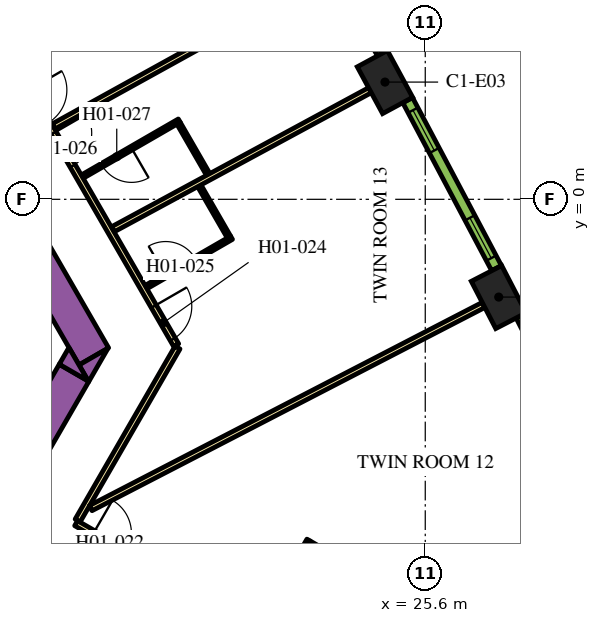
"""IFC4 building model, lengths in metres.
Left out: names, types, materials, properties, quantities, classifications, styles, units other than length and angle.
Written with IfcOpenShell. Run it as: python <this file> out.ifc"""

import sys

from ifc_helpers import new_model, si_unit, direction, frame, frame_2d, origin, origin_2d, place, context, subcontext, project, spatial, polyline, rectangle, outline, extrude, element, fill, save


model = new_model("IFC4")
c1 = context("Model", 3, precision=1e-05, world=origin(), true_north=direction((0.0, 1.0)))
c2 = subcontext(c1, "Body", "Model", "MODEL_VIEW")
j1 = project(units=[si_unit("LENGTHUNIT", "METRE"), si_unit("PLANEANGLEUNIT", "RADIAN")], contexts=[c1])
p1 = place(None, origin())
s1 = spatial("IfcSite", under=j1, at=p1, CompositionType="ELEMENT")
p2 = place(p1, origin())
s2 = spatial("IfcBuilding", under=s1, at=p2, CompositionType="ELEMENT")
p3 = place(p2, frame((0.0, 0.0, 31.5)))
s3 = spatial("IfcBuildingStorey", under=s2, at=p3, CompositionType="ELEMENT", Elevation=31.5)
for number, where, z_axis, x_axis in (
    (1, (27.533, -2.572, 0.0), (0.0, 0.0, 1.0), (-0.459, 0.888, 0.0)),
    (2, (24.54, 3.085, 0.0), (0.0, 0.0, 1.0), (-0.476, 0.88, 0.0)),
):
    element("IfcColumn", number, at=place(p3, frame(where, z_axis=z_axis, x_axis=x_axis)), inside=s3, PredefinedType="COLUMN", context=c2, shape_type="SweptSolid", body=[
        extrude(rectangle(XDim=1.4, YDim=0.9, at=origin_2d()), origin(), (0.0, 0.0, 1.0), 3.9),
    ])
p4 = place(p3, frame((6.711, 13.476, 0.0), z_axis=(0.0, 0.0, 1.0), x_axis=(0.500002723396, -0.866023831425, 0.0)))
e3 = element("IfcWall", 3, at=p4, inside=s3, PredefinedType="SOLIDWALL", context=c2, shape_type="SweptSolid", body=[
    extrude(rectangle(XDim=20.334, YDim=0.9, at=frame_2d((10.167, 0.0))), origin(), (0.0, 0.0, 1.0), 3.9),
])
p5 = place(p3, origin())
e4 = element("IfcWall", 4, at=p5, inside=s3, PredefinedType="SOLIDWALL", context=c2, shape_type="SweptSolid", body=[
    extrude(outline(polyline([(16.743, -4.8), (16.489, -4.36), (17.251, -3.92), (16.743, -4.8)])), origin(), (0.0, 0.0, 1.0), 3.9),
])
p6 = place(p3, frame((11.695, -12.644, 0.0), z_axis=(0.0, 0.0, 1.0), x_axis=(0.500010229568, 0.86601949766, 0.0)))
e5 = element("IfcWall", 5, at=p6, inside=s3, PredefinedType="SOLIDWALL", context=c2, shape_type="SweptSolid", body=[
    extrude(rectangle(XDim=9.326, YDim=0.9, at=frame_2d((4.663, 0.0))), origin(), (0.0, 0.0, 1.0), 3.9),
])
e6 = element("IfcWall", 6, at=p5, inside=s3, PredefinedType="SOLIDWALL", context=c2, shape_type="SweptSolid", body=[
    extrude(outline(polyline([(16.223, -3.9), (16.732, -4.78), (15.969, -4.34), (16.223, -3.9)])), origin(), (0.0, 0.0, 1.0), 3.9),
])
p7 = place(p3, frame((16.412, -8.523, 0.0), z_axis=(0.0, 0.0, 1.0), x_axis=(0.866022197818, -0.500005552856, 0.0)))
e7 = element("IfcWall", 7, at=p7, inside=s3, PredefinedType="PARTITIONING", context=c2, shape_type="SweptSolid", body=[
    extrude(rectangle(XDim=16.224, YDim=0.15, at=frame_2d((8.112, 0.0))), origin(), (0.0, 0.0, 1.0), 2.75),
])
p8 = place(p7, frame((7.949, 0.0, 0.0)))
e8 = element("IfcOpeningElement", 8, at=p8, cuts=e7, PredefinedType="OPENING", context=c2, shape_type="SweptSolid", body=[
    extrude(rectangle(XDim=1.0, YDim=2.1, at=frame_2d((0.5, 1.05))), frame((0.0, 0.085, 0.0), z_axis=(0.0, -1.0, 0.0), x_axis=(1.0, 0.0, 0.0)), (0.0, 0.0, 1.0), 0.17),
])
p9 = place(p7, frame((0.526, 0.0, 0.0)))
e9 = element("IfcOpeningElement", 9, at=p9, cuts=e7, PredefinedType="OPENING", context=c2, shape_type="SweptSolid", body=[
    extrude(rectangle(XDim=1.0, YDim=2.1, at=frame_2d((0.5, 1.05))), frame((0.0, 0.085, 0.0), z_axis=(0.0, -1.0, 0.0), x_axis=(1.0, 0.0, 0.0)), (0.0, 0.0, 1.0), 0.17),
])
p10 = place(p3, frame((19.081, -3.9, 0.0), z_axis=(0.0, 0.0, 1.0), x_axis=(-0.499974327079, -0.866040225545, 0.0)))
e10 = element("IfcWall", 10, at=p10, inside=s3, PredefinedType="PARTITIONING", context=c2, shape_type="SweptSolid", body=[
    extrude(rectangle(XDim=5.258, YDim=0.15, at=frame_2d((2.629, 0.0))), origin(), (0.0, 0.0, 1.0), 2.75),
])
p11 = place(p3, frame((6.163, 18.475, 0.0), z_axis=(0.0, 0.0, 1.0), x_axis=(0.500001317485, -0.866024643133, 0.0)))
e11 = element("IfcWall", 11, at=p11, inside=s3, PredefinedType="PARTITIONING", context=c2, shape_type="SweptSolid", body=[
    extrude(rectangle(XDim=25.767, YDim=0.15, at=frame_2d((12.883, 0.0))), origin(), (0.0, 0.0, 1.0), 2.75),
])
p12 = place(p11, frame((24.586, 0.0, 0.0)))
e12 = element("IfcOpeningElement", 12, at=p12, cuts=e11, PredefinedType="OPENING", context=c2, shape_type="SweptSolid", body=[
    extrude(rectangle(XDim=1.0, YDim=2.1, at=frame_2d((0.5, 1.05))), frame((0.0, 0.085, 0.0), z_axis=(0.0, -1.0, 0.0), x_axis=(1.0, 0.0, 0.0)), (0.0, 0.0, 1.0), 0.17),
])
p13 = place(p11, frame((19.319, 0.0, 0.0)))
e13 = element("IfcOpeningElement", 13, at=p13, cuts=e11, PredefinedType="OPENING", context=c2, shape_type="SweptSolid", body=[
    extrude(rectangle(XDim=1.0, YDim=2.1, at=frame_2d((0.5, 1.05))), frame((0.0, 0.085, 0.0), z_axis=(0.0, -1.0, 0.0), x_axis=(1.0, 0.0, 0.0)), (0.0, 0.0, 1.0), 0.17),
])
p14 = place(p11, frame((18.012, 0.0, 0.0)))
e14 = element("IfcOpeningElement", 14, at=p14, cuts=e11, PredefinedType="OPENING", context=c2, shape_type="SweptSolid", body=[
    extrude(rectangle(XDim=1.0, YDim=2.1, at=frame_2d((0.5, 1.05))), frame((0.0, 0.085, 0.0), z_axis=(0.0, -1.0, 0.0), x_axis=(1.0, 0.0, 0.0)), (0.0, 0.0, 1.0), 0.17),
])
p15 = place(p11, frame((6.824, 0.0, 0.0)))
e15 = element("IfcOpeningElement", 15, at=p15, cuts=e11, PredefinedType="OPENING", context=c2, shape_type="SweptSolid", body=[
    extrude(rectangle(XDim=1.1, YDim=2.1, at=frame_2d((0.55, 1.05))), frame((0.0, 0.085, 0.0), z_axis=(0.0, -1.0, 0.0), x_axis=(1.0, 0.0, 0.0)), (0.0, 0.0, 1.0), 0.17),
])
p16 = place(p11, frame((4.658, 0.0, 0.0)))
e16 = element("IfcOpeningElement", 16, at=p16, cuts=e11, PredefinedType="OPENING", context=c2, shape_type="SweptSolid", body=[
    extrude(rectangle(XDim=0.9, YDim=2.1, at=frame_2d((0.45, 1.05))), frame((0.0, 0.085, 0.0), z_axis=(0.0, -1.0, 0.0), x_axis=(1.0, 0.0, 0.0)), (0.0, 0.0, 1.0), 0.17),
])
p17 = place(p11, frame((0.18, 0.0, 0.0)))
e17 = element("IfcOpeningElement", 17, at=p17, cuts=e11, PredefinedType="OPENING", context=c2, shape_type="SweptSolid", body=[
    extrude(rectangle(XDim=1.0, YDim=2.1, at=frame_2d((0.5, 1.05))), frame((0.0, 0.085, 0.0), z_axis=(0.0, -1.0, 0.0), x_axis=(1.0, 0.0, 0.0)), (0.0, 0.0, 1.0), 0.17),
])
p18 = place(p3, frame((23.132, 5.962, 0.0), z_axis=(0.0, 0.0, 1.0), x_axis=(-0.875121716713, -0.483902863121, 0.0)))
e18 = element("IfcWall", 18, at=p18, inside=s3, PredefinedType="PARTITIONING", context=c2, shape_type="SweptSolid", body=[
    extrude(rectangle(XDim=8.355, YDim=0.15, at=frame_2d((4.178, 0.0))), origin(), (0.0, 0.0, 1.0), 2.75),
])
p19 = place(p3, frame((27.134, -2.779, 0.0), z_axis=(0.0, 0.0, 1.0), x_axis=(-0.8882049501, -0.459447457951, 0.0)))
e19 = element("IfcWall", 19, at=p19, inside=s3, PredefinedType="PARTITIONING", context=c2, shape_type="SweptSolid", body=[
    extrude(rectangle(XDim=11.638, YDim=0.15, at=frame_2d((5.819, 0.0))), origin(), (0.0, 0.0, 1.0), 2.75),
])
p20 = place(p3, frame((24.145, 2.871, 0.0), z_axis=(0.0, 0.0, 1.0), x_axis=(-0.879551725039, -0.475803281809, 0.0)))
e20 = element("IfcWall", 20, at=p20, inside=s3, PredefinedType="PARTITIONING", context=c2, shape_type="SweptSolid", body=[
    extrude(rectangle(XDim=7.688, YDim=0.15, at=frame_2d((3.844, 0.0))), origin(), (0.0, 0.0, 1.0), 2.75),
])
p21 = place(p3, frame((30.018, -8.483, 0.0), z_axis=(0.0, 0.0, 1.0), x_axis=(-0.896544505264, -0.44295366584, 0.0)))
e21 = element("IfcWall", 21, at=p21, inside=s3, PredefinedType="PARTITIONING", context=c2, shape_type="SweptSolid", body=[
    extrude(rectangle(XDim=8.079, YDim=0.15, at=frame_2d((4.04, 0.0))), origin(), (0.0, 0.0, 1.0), 2.75),
])
p22 = place(p3, frame((22.53, -8.966, 0.0), z_axis=(0.0, 0.0, 1.0), x_axis=(-0.500006934395, -0.866021400173, 0.0)))
e22 = element("IfcWall", 22, at=p22, inside=s3, PredefinedType="PARTITIONING", context=c2, shape_type="SweptSolid", body=[
    extrude(rectangle(XDim=2.6, YDim=0.1, at=frame_2d((1.3, 0.0))), origin(), (0.0, 0.0, 1.0), 2.75),
])
p23 = place(p22, frame((1.1, 0.0, 0.0)))
e23 = element("IfcOpeningElement", 23, at=p23, cuts=e22, PredefinedType="OPENING", context=c2, shape_type="SweptSolid", body=[
    extrude(rectangle(XDim=0.9, YDim=2.1, at=frame_2d((0.45, 1.05))), frame((0.0, 0.06, 0.0), z_axis=(0.0, -1.0, 0.0), x_axis=(1.0, 0.0, 0.0)), (0.0, 0.0, 1.0), 0.12),
])
p24 = place(p3, frame((22.549, -9.035, 0.0), z_axis=(0.0, 0.0, 1.0), x_axis=(0.86605165483, -0.499954529098, 0.0)))
e24 = element("IfcWall", 24, at=p24, inside=s3, PredefinedType="PARTITIONING", context=c2, shape_type="SweptSolid", body=[
    extrude(rectangle(XDim=1.7, YDim=0.1, at=frame_2d((0.85, 0.0))), origin(), (0.0, 0.0, 1.0), 2.75),
])
p25 = place(p3, frame((18.25, -2.311, 0.0), z_axis=(0.0, 0.0, 1.0), x_axis=(0.866021400173, 0.500006934395, 0.0)))
e25 = element("IfcWall", 25, at=p25, inside=s3, PredefinedType="PARTITIONING", context=c2, shape_type="SweptSolid", body=[
    extrude(rectangle(XDim=2.6, YDim=0.1, at=frame_2d((1.3, 0.0))), origin(), (0.0, 0.0, 1.0), 2.75),
])
p26 = place(p25, frame((0.6, 0.0, 0.0)))
e26 = element("IfcOpeningElement", 26, at=p26, cuts=e25, PredefinedType="OPENING", context=c2, shape_type="SweptSolid", body=[
    extrude(rectangle(XDim=0.9, YDim=2.1, at=frame_2d((0.45, 1.05))), frame((0.0, 0.06, 0.0), z_axis=(0.0, -1.0, 0.0), x_axis=(1.0, 0.0, 0.0)), (0.0, 0.0, 1.0), 0.12),
])
p27 = place(p3, frame((20.434, -0.993, 0.0), z_axis=(0.0, 0.0, 1.0), x_axis=(-0.500086022567, 0.865975732936, 0.0)))
e27 = element("IfcWall", 27, at=p27, inside=s3, PredefinedType="PARTITIONING", context=c2, shape_type="SweptSolid", body=[
    extrude(rectangle(XDim=1.55, YDim=0.1, at=frame_2d((0.775, 0.0))), origin(), (0.0, 0.0, 1.0), 2.75),
])
p28 = place(p3, frame((19.127, 2.071, 0.0), z_axis=(0.0, 0.0, 1.0), x_axis=(-0.866003658127, -0.500037662692, 0.0)))
e28 = element("IfcWall", 28, at=p28, inside=s3, PredefinedType="PARTITIONING", context=c2, shape_type="SweptSolid", body=[
    extrude(rectangle(XDim=2.95, YDim=0.1, at=frame_2d((1.475, 0.0))), origin(), (0.0, 0.0, 1.0), 2.75),
])
p29 = place(p28, frame((1.45, 0.0, 0.0)))
e29 = element("IfcOpeningElement", 29, at=p29, cuts=e28, PredefinedType="OPENING", context=c2, shape_type="SweptSolid", body=[
    extrude(rectangle(XDim=0.9, YDim=2.1, at=frame_2d((0.45, 1.05))), frame((0.0, 0.06, 0.0), z_axis=(0.0, -1.0, 0.0), x_axis=(1.0, 0.0, 0.0)), (0.0, 0.0, 1.0), 0.12),
])
p30 = place(p3, frame((19.109, 2.002, 0.0), z_axis=(0.0, 0.0, 1.0), x_axis=(0.500086022567, -0.865975732936, 0.0)))
e30 = element("IfcWall", 30, at=p30, inside=s3, PredefinedType="PARTITIONING", context=c2, shape_type="SweptSolid", body=[
    extrude(rectangle(XDim=1.55, YDim=0.1, at=frame_2d((0.775, 0.0))), origin(), (0.0, 0.0, 1.0), 2.75),
])
p31 = place(p3, frame((30.377, -7.521, 0.0), z_axis=(0.0, 0.0, 1.0), x_axis=(-0.451233929645, 0.892405704115, 0.0)))
e31 = element("IfcWall", 31, at=p31, inside=s3, PredefinedType="SOLIDWALL", context=c2, shape_type="SweptSolid", body=[
    extrude(rectangle(XDim=4.998, YDim=0.29, at=frame_2d((2.499, 0.0))), origin(), (0.0, 0.0, 1.0), 3.65),
])
p32 = place(p31, frame((0.297, 0.0, 0.9)))
e32 = element("IfcOpeningElement", 32, at=p32, cuts=e31, PredefinedType="OPENING", context=c2, shape_type="SweptSolid", body=[
    extrude(rectangle(XDim=1.2, YDim=2.15, at=frame_2d((0.6, 1.075))), frame((0.0, 0.155, 0.0), z_axis=(0.0, -1.0, 0.0), x_axis=(1.0, 0.0, 0.0)), (0.0, 0.0, 1.0), 0.31),
])
p33 = place(p31, frame((3.501, 0.0, 0.9)))
e33 = element("IfcOpeningElement", 33, at=p33, cuts=e31, PredefinedType="OPENING", context=c2, shape_type="SweptSolid", body=[
    extrude(rectangle(XDim=1.2, YDim=2.15, at=frame_2d((0.6, 1.075))), frame((0.0, 0.155, 0.0), z_axis=(0.0, -1.0, 0.0), x_axis=(1.0, 0.0, 0.0)), (0.0, 0.0, 1.0), 0.31),
])
p34 = place(p3, frame((27.475, -1.81, 0.0), z_axis=(0.0, 0.0, 1.0), x_axis=(-0.467629620899, 0.883924509026, 0.0)))
e34 = element("IfcWall", 34, at=p34, inside=s3, PredefinedType="SOLIDWALL", context=c2, shape_type="SweptSolid", body=[
    extrude(rectangle(XDim=4.998, YDim=0.29, at=frame_2d((2.499, 0.0))), origin(), (0.0, 0.0, 1.0), 3.65),
])
p35 = place(p34, frame((0.297, 0.0, 0.9)))
e35 = element("IfcOpeningElement", 35, at=p35, cuts=e34, PredefinedType="OPENING", context=c2, shape_type="SweptSolid", body=[
    extrude(rectangle(XDim=1.2, YDim=2.15, at=frame_2d((0.6, 1.075))), frame((0.0, 0.155, 0.0), z_axis=(0.0, -1.0, 0.0), x_axis=(1.0, 0.0, 0.0)), (0.0, 0.0, 1.0), 0.31),
])
p36 = place(p34, frame((3.501, 0.0, 0.9)))
e36 = element("IfcOpeningElement", 36, at=p36, cuts=e34, PredefinedType="OPENING", context=c2, shape_type="SweptSolid", body=[
    extrude(rectangle(XDim=1.2, YDim=2.15, at=frame_2d((0.6, 1.075))), frame((0.0, 0.155, 0.0), z_axis=(0.0, -1.0, 0.0), x_axis=(1.0, 0.0, 0.0)), (0.0, 0.0, 1.0), 0.31),
])
p37 = place(p3, frame((24.468, 3.846, 0.0), z_axis=(0.0, 0.0, 1.0), x_axis=(-0.483912572871, 0.875116347589, 0.0)))
e37 = element("IfcWall", 37, at=p37, inside=s3, PredefinedType="SOLIDWALL", context=c2, shape_type="SweptSolid", body=[
    extrude(rectangle(XDim=4.998, YDim=0.29, at=frame_2d((2.499, 0.0))), origin(), (0.0, 0.0, 1.0), 3.65),
])
p38 = place(p37, frame((0.297, 0.0, 0.9)))
e38 = element("IfcOpeningElement", 38, at=p38, cuts=e37, PredefinedType="OPENING", context=c2, shape_type="SweptSolid", body=[
    extrude(rectangle(XDim=1.2, YDim=2.15, at=frame_2d((0.6, 1.075))), frame((0.0, 0.155, 0.0), z_axis=(0.0, -1.0, 0.0), x_axis=(1.0, 0.0, 0.0)), (0.0, 0.0, 1.0), 0.31),
])
p39 = place(p37, frame((3.501, 0.0, 0.9)))
e39 = element("IfcOpeningElement", 39, at=p39, cuts=e37, PredefinedType="OPENING", context=c2, shape_type="SweptSolid", body=[
    extrude(rectangle(XDim=1.2, YDim=2.15, at=frame_2d((0.6, 1.075))), frame((0.0, 0.155, 0.0), z_axis=(0.0, -1.0, 0.0), x_axis=(1.0, 0.0, 0.0)), (0.0, 0.0, 1.0), 0.31),
])
p40 = place(p9, origin())
e40 = element("IfcDoor", 40, at=p40, inside=s3, OperationType="SINGLE_SWING_LEFT", PredefinedType="DOOR", context=c2, shape_type="SweptSolid", body=[
    extrude(rectangle(XDim=1.0, YDim=2.1, at=frame_2d((0.5, 1.05))), frame((0.0, 0.025, 0.0), z_axis=(0.0, -1.0, 0.0), x_axis=(1.0, 0.0, 0.0)), (0.0, 0.0, 1.0), 0.05),
])
fill(e9, e40)
p41 = place(p12, origin())
e41 = element("IfcDoor", 41, at=p41, inside=s3, OperationType="SINGLE_SWING_RIGHT", PredefinedType="DOOR", context=c2, shape_type="SweptSolid", body=[
    extrude(rectangle(XDim=1.0, YDim=2.1, at=frame_2d((0.5, 1.05))), frame((0.0, 0.025, 0.0), z_axis=(0.0, -1.0, 0.0), x_axis=(1.0, 0.0, 0.0)), (0.0, 0.0, 1.0), 0.05),
])
fill(e12, e41)
p42 = place(p26, origin())
e42 = element("IfcDoor", 42, at=p42, inside=s3, OperationType="SINGLE_SWING_LEFT", PredefinedType="DOOR", context=c2, shape_type="SweptSolid", body=[
    extrude(rectangle(XDim=0.9, YDim=2.1, at=frame_2d((0.45, 1.05))), frame((0.0, 0.025, 0.0), z_axis=(0.0, -1.0, 0.0), x_axis=(1.0, 0.0, 0.0)), (0.0, 0.0, 1.0), 0.05),
])
fill(e26, e42)
p43 = place(p13, origin())
e43 = element("IfcDoor", 43, at=p43, inside=s3, OperationType="SINGLE_SWING_LEFT", PredefinedType="DOOR", context=c2, shape_type="SweptSolid", body=[
    extrude(rectangle(XDim=1.0, YDim=2.1, at=frame_2d((0.5, 1.05))), frame((0.0, 0.025, 0.0), z_axis=(0.0, -1.0, 0.0), x_axis=(1.0, 0.0, 0.0)), (0.0, 0.0, 1.0), 0.05),
])
fill(e13, e43)
p44 = place(p29, origin())
e44 = element("IfcDoor", 44, at=p44, inside=s3, OperationType="SINGLE_SWING_LEFT", PredefinedType="DOOR", context=c2, shape_type="SweptSolid", body=[
    extrude(rectangle(XDim=0.9, YDim=2.1, at=frame_2d((0.45, 1.05))), frame((0.0, 0.025, 0.0), z_axis=(0.0, -1.0, 0.0), x_axis=(1.0, 0.0, 0.0)), (0.0, 0.0, 1.0), 0.05),
])
fill(e29, e44)
p45 = place(p35, origin())
e45 = element("IfcWindow", 45, at=p45, inside=s3, PartitioningType="DOUBLE_PANEL_VERTICAL", PredefinedType="WINDOW", context=c2, shape_type="SweptSolid", body=[
    extrude(rectangle(XDim=1.2, YDim=2.15, at=frame_2d((0.6, 1.075))), frame((0.0, 0.015, 0.0), z_axis=(0.0, -1.0, 0.0), x_axis=(1.0, 0.0, 0.0)), (0.0, 0.0, 1.0), 0.06),
])
fill(e35, e45)
p46 = place(p36, origin())
e46 = element("IfcWindow", 46, at=p46, inside=s3, PartitioningType="DOUBLE_PANEL_VERTICAL", PredefinedType="WINDOW", context=c2, shape_type="SweptSolid", body=[
    extrude(rectangle(XDim=1.2, YDim=2.15, at=frame_2d((0.6, 1.075))), frame((0.0, 0.015, 0.0), z_axis=(0.0, -1.0, 0.0), x_axis=(1.0, 0.0, 0.0)), (0.0, 0.0, 1.0), 0.06),
])
fill(e36, e46)
save(model, sys.argv[1])
